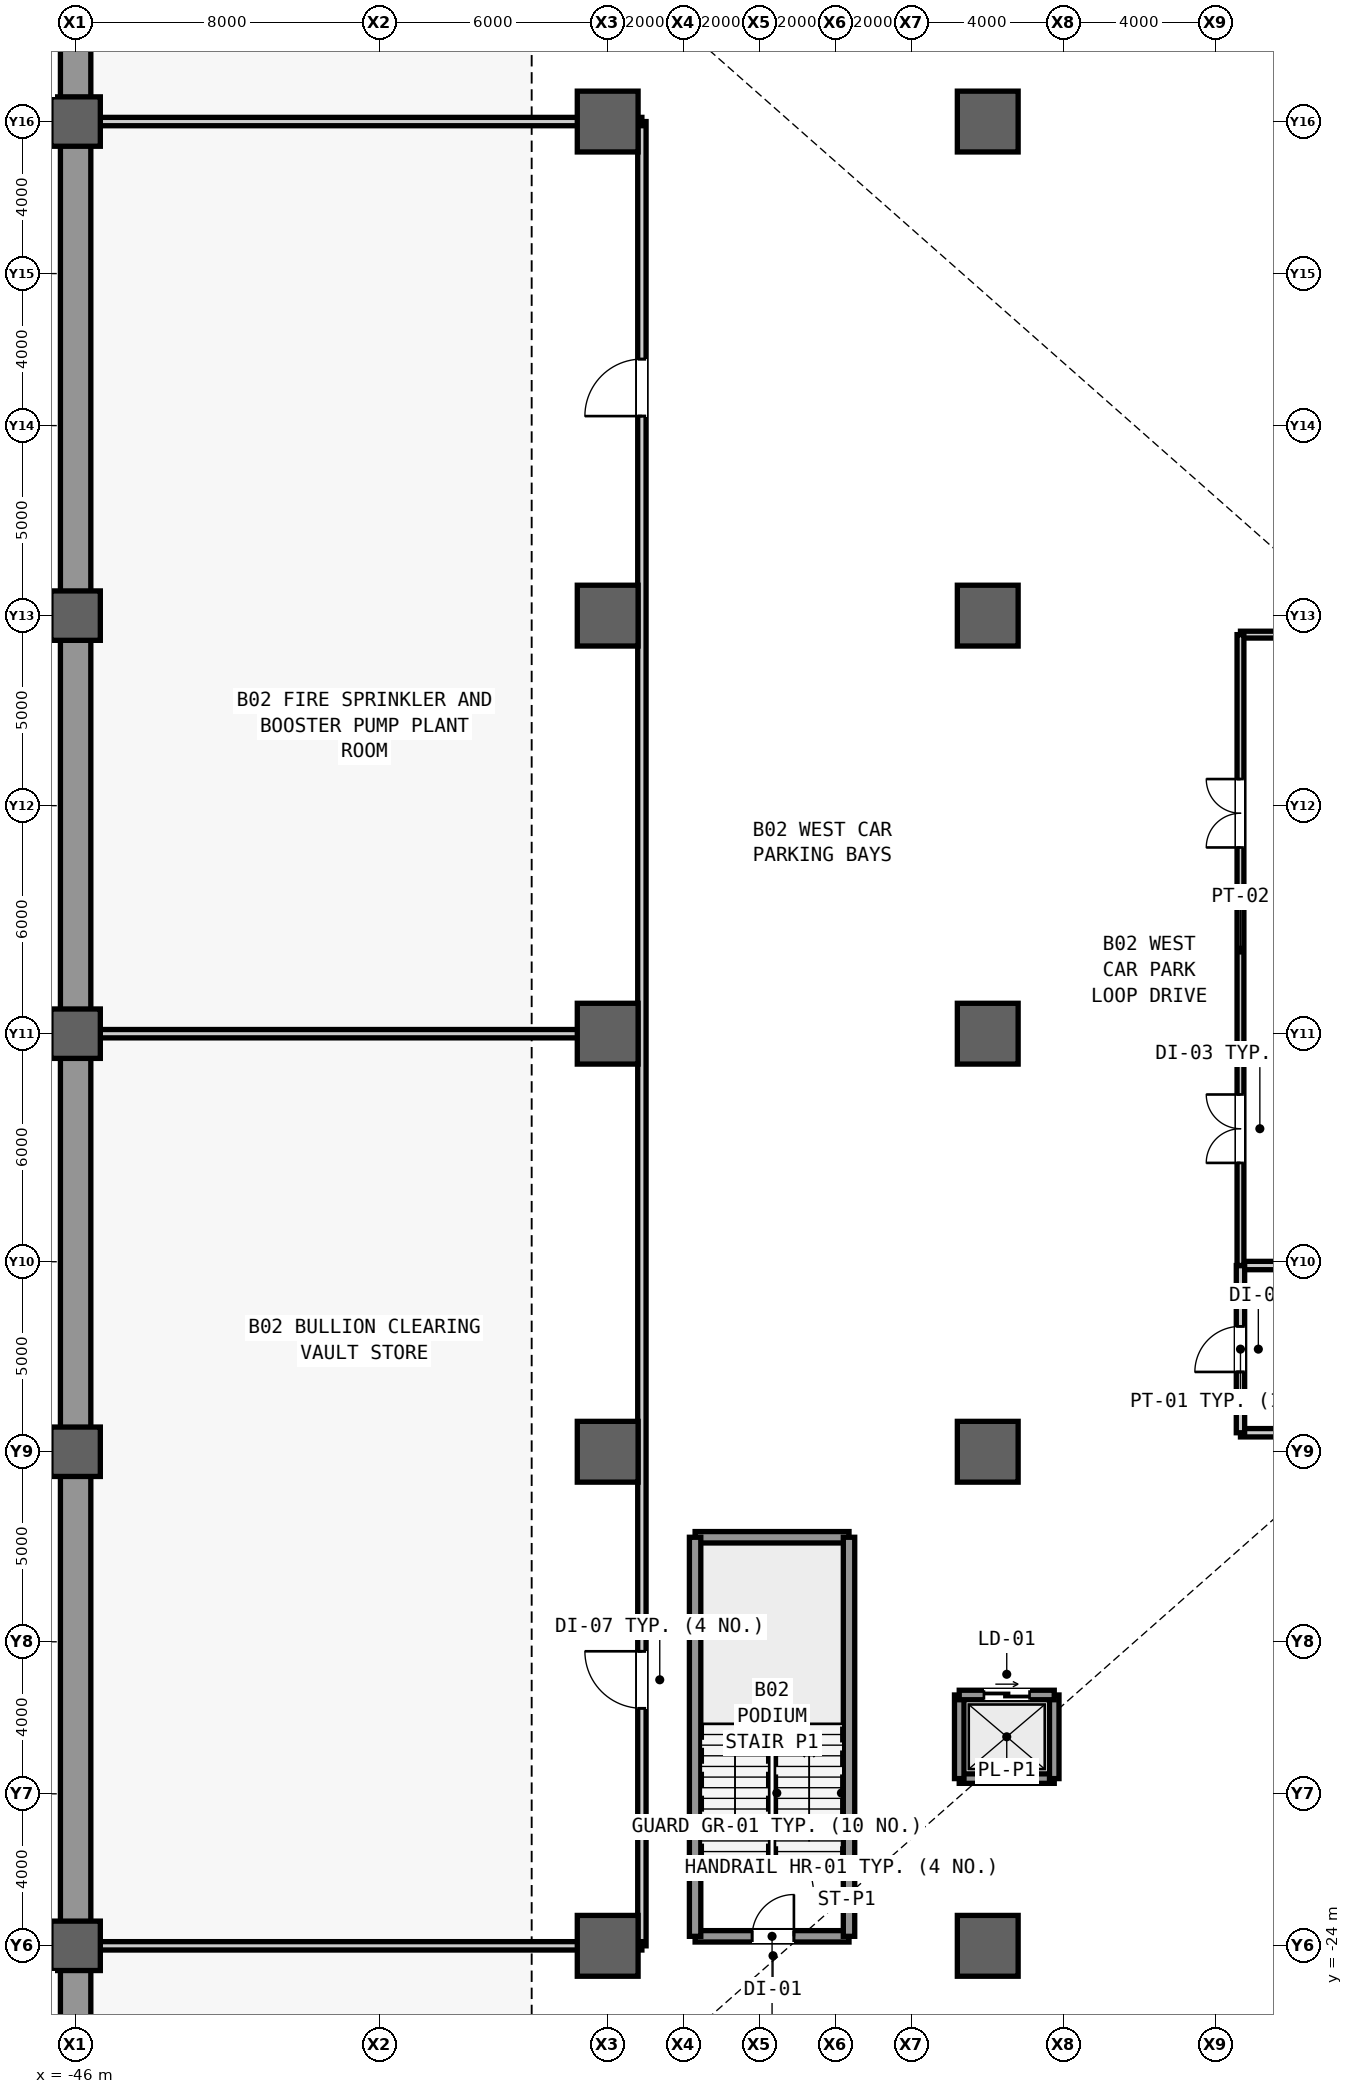
"""IFC4 building model, lengths in metres.
Left out: names, types, materials, properties, quantities, classifications, styles, units other than length and angle.
Written with IfcOpenShell. Run it as: python <this file> out.ifc"""

import sys

from ifc_helpers import new_model, si_unit, direction, frame, frame_2d, origin, origin_2d, place, context, subcontext, project, spatial, rectangle, extrude, source, transform, mapped, element, fill, save


model = new_model("IFC4")
c1 = context("Model", 3, precision=1e-05, world=origin(), true_north=direction((0.0, 1.0)))
c2 = subcontext(c1, "Body", "Model", "MODEL_VIEW")
j1 = project(units=[si_unit("LENGTHUNIT", "METRE"), si_unit("PLANEANGLEUNIT", "RADIAN")], contexts=[c1])
p1 = place(None, origin())
s1 = spatial("IfcSite", under=j1, at=p1, CompositionType="ELEMENT")
p2 = place(p1, origin())
s2 = spatial("IfcBuilding", under=s1, at=p2, CompositionType="ELEMENT")
p3 = place(p2, frame((0.0, 0.0, -9.6)))
s3 = spatial("IfcBuildingStorey", under=s2, at=p3, CompositionType="ELEMENT", Elevation=-9.6)
m1 = source(origin(), c2, "Body", "SweptSolid", [
    extrude(rectangle(XDim=74.4, YDim=0.8, at=frame_2d((37.2, 0.0))), origin(), (0.0, 0.0, 1.0), 4.48),
])
p4 = place(p3, frame((-46.0, -37.2, 0.0), z_axis=(0.0, 0.0, 1.0), x_axis=(0.0, 1.0, 0.0)))
e1 = element("IfcWall", 1, at=p4, inside=s3, PredefinedType="USERDEFINED", context=c2, shape_type="MappedRepresentation", body=[
    mapped(m1, transform((0.0, 0.0, 0.0), scale=1.0)),
])
m2 = source(origin(), c2, "Body", "SweptSolid", [
    extrude(rectangle(XDim=1.3, YDim=1.3, at=origin_2d()), origin(), (0.0, 0.0, 1.0), 4.8),
])
for number, where, z_axis, x_axis in (
    (2, (-46.0, -24.0, 0.0), (0.0, 0.0, 1.0), (1.0, 0.0, 0.0)),
    (3, (-46.0, -11.0, 0.0), (0.0, 0.0, 1.0), (1.0, 0.0, 0.0)),
    (4, (-46.0, 0.0, 0.0), (0.0, 0.0, 1.0), (1.0, 0.0, 0.0)),
    (5, (-46.0, 11.0, 0.0), (0.0, 0.0, 1.0), (1.0, 0.0, 0.0)),
    (6, (-46.0, 24.0, 0.0), (0.0, 0.0, 1.0), (1.0, 0.0, 0.0)),
):
    element("IfcColumn", number, at=place(p3, frame(where, z_axis=z_axis, x_axis=x_axis)), inside=s3, PredefinedType="COLUMN", context=c2, shape_type="MappedRepresentation", body=[
        mapped(m2, transform((0.0, 0.0, 0.0), scale=1.0)),
    ])
m3 = source(origin(), c2, "Body", "SweptSolid", [
    extrude(rectangle(XDim=1.6, YDim=1.6, at=origin_2d()), origin(), (0.0, 0.0, 1.0), 4.8),
])
for number, where, z_axis, x_axis in (
    (7, (-32.0, -24.0, 0.0), (0.0, 0.0, 1.0), (1.0, 0.0, 0.0)),
    (8, (-32.0, -11.0, 0.0), (0.0, 0.0, 1.0), (1.0, 0.0, 0.0)),
    (9, (-32.0, 0.0, 0.0), (0.0, 0.0, 1.0), (1.0, 0.0, 0.0)),
    (10, (-32.0, 11.0, 0.0), (0.0, 0.0, 1.0), (1.0, 0.0, 0.0)),
    (11, (-32.0, 24.0, 0.0), (0.0, 0.0, 1.0), (1.0, 0.0, 0.0)),
    (12, (-22.0, -24.0, 0.0), (0.0, 0.0, 1.0), (1.0, 0.0, 0.0)),
    (13, (-22.0, -11.0, 0.0), (0.0, 0.0, 1.0), (1.0, 0.0, 0.0)),
    (14, (-22.0, 0.0, 0.0), (0.0, 0.0, 1.0), (1.0, 0.0, 0.0)),
    (15, (-22.0, 11.0, 0.0), (0.0, 0.0, 1.0), (1.0, 0.0, 0.0)),
    (16, (-22.0, 24.0, 0.0), (0.0, 0.0, 1.0), (1.0, 0.0, 0.0)),
):
    element("IfcColumn", number, at=place(p3, frame(where, z_axis=z_axis, x_axis=x_axis)), inside=s3, PredefinedType="COLUMN", context=c2, shape_type="MappedRepresentation", body=[
        mapped(m3, transform((0.0, 0.0, 0.0), scale=1.0)),
    ])
m4 = source(origin(), c2, "Body", "SweptSolid", [
    extrude(rectangle(XDim=4.05, YDim=0.22, at=frame_2d((2.025, 0.0))), origin(), (0.0, 0.0, 1.0), 4.48),
])
for number, where, z_axis, x_axis in (
    (17, (-15.35, -10.5, 0.0), (0.0, 0.0, 1.0), (1.0, 0.0, 0.0)),
    (18, (-15.35, -6.1, 0.0), (0.0, 0.0, 1.0), (1.0, 0.0, 0.0)),
):
    element("IfcWall", number, at=place(p3, frame(where, z_axis=z_axis, x_axis=x_axis)), inside=s3, PredefinedType="PARTITIONING", context=c2, shape_type="MappedRepresentation", body=[
        mapped(m4, transform((0.0, 0.0, 0.0), scale=1.0)),
    ])
m5 = source(origin(), c2, "Body", "SweptSolid", [
    extrude(rectangle(XDim=4.4, YDim=0.22, at=frame_2d((2.2, 0.0))), origin(), (0.0, 0.0, 1.0), 4.48),
])
p5 = place(p3, frame((-15.35, -10.5, 0.0), z_axis=(0.0, 0.0, 1.0), x_axis=(0.0, 1.0, 0.0)))
e19 = element("IfcWall", 19, at=p5, inside=s3, PredefinedType="PARTITIONING", context=c2, shape_type="MappedRepresentation", body=[
    mapped(m5, transform((0.0, 0.0, 0.0), scale=1.0)),
])
m6 = source(origin(), c2, "Body", "SweptSolid", [
    extrude(rectangle(XDim=1.2, YDim=2.2, at=frame_2d((0.6, 1.1))), frame((0.0, 0.12, 0.0), z_axis=(0.0, -1.0, 0.0), x_axis=(1.0, 0.0, 0.0)), (0.0, 0.0, 1.0), 0.24),
])
p6 = place(p5, frame((1.6, 0.0, 0.0)))
e20 = element("IfcOpeningElement", 20, at=p6, cuts=e19, PredefinedType="OPENING", context=c2, shape_type="MappedRepresentation", body=[
    mapped(m6, transform((0.0, 0.0, 0.0), scale=1.0)),
])
m7 = source(origin(), c2, "Body", "SweptSolid", [
    extrude(rectangle(XDim=4.05, YDim=0.18, at=frame_2d((2.025, 0.0))), origin(), (0.0, 0.0, 1.0), 4.48),
])
p7 = place(p3, frame((-15.35, 10.5, 0.0), z_axis=(0.0, 0.0, 1.0), x_axis=(1.0, 0.0, 0.0)))
e21 = element("IfcWall", 21, at=p7, inside=s3, PredefinedType="PARTITIONING", context=c2, shape_type="MappedRepresentation", body=[
    mapped(m7, transform((0.0, 0.0, 0.0), scale=1.0)),
])
m8 = source(origin(), c2, "Body", "SweptSolid", [
    extrude(rectangle(XDim=16.6, YDim=0.18, at=frame_2d((8.3, 0.0))), origin(), (0.0, 0.0, 1.0), 4.48),
])
p8 = place(p3, frame((-15.35, -6.1, 0.0), z_axis=(0.0, 0.0, 1.0), x_axis=(0.0, 1.0, 0.0)))
e22 = element("IfcWall", 22, at=p8, inside=s3, PredefinedType="PARTITIONING", context=c2, shape_type="MappedRepresentation", body=[
    mapped(m8, transform((0.0, 0.0, 0.0), scale=1.0)),
])
m9 = source(origin(), c2, "Body", "SweptSolid", [
    extrude(rectangle(XDim=1.8, YDim=2.25, at=frame_2d((0.9, 1.125))), frame((0.0, 0.1, 0.0), z_axis=(0.0, -1.0, 0.0), x_axis=(1.0, 0.0, 0.0)), (0.0, 0.0, 1.0), 0.2),
])
p9 = place(p8, frame((2.7, 0.0, 0.0)))
e23 = element("IfcOpeningElement", 23, at=p9, cuts=e22, PredefinedType="OPENING", context=c2, shape_type="MappedRepresentation", body=[
    mapped(m9, transform((0.0, 0.0, 0.0), scale=1.0)),
])
p10 = place(p8, frame((11.0, 0.0, 0.0)))
e24 = element("IfcOpeningElement", 24, at=p10, cuts=e22, PredefinedType="OPENING", context=c2, shape_type="MappedRepresentation", body=[
    mapped(m9, transform((0.0, 0.0, 0.0), scale=1.0)),
])
m10 = source(origin(), c2, "Body", "SweptSolid", [
    extrude(rectangle(XDim=4.05, YDim=0.3, at=frame_2d((2.025, 0.0))), origin(), (0.0, 0.0, 1.0), 4.48),
])
p11 = place(p3, frame((-29.7, -23.75, 0.0), z_axis=(0.0, 0.0, 1.0), x_axis=(1.0, 0.0, 0.0)))
e25 = element("IfcWall", 25, at=p11, inside=s3, PredefinedType="SHEAR", context=c2, shape_type="MappedRepresentation", body=[
    mapped(m10, transform((0.0, 0.0, 0.0), scale=1.0)),
])
m11 = source(origin(), c2, "Body", "SweptSolid", [
    extrude(rectangle(XDim=1.1, YDim=2.2, at=frame_2d((0.55, 1.1))), frame((0.0, 0.16, 0.0), z_axis=(0.0, -1.0, 0.0), x_axis=(1.0, 0.0, 0.0)), (0.0, 0.0, 1.0), 0.32),
])
p12 = place(p11, frame((1.5, 0.0, 0.0)))
e26 = element("IfcOpeningElement", 26, at=p12, cuts=e25, PredefinedType="OPENING", context=c2, shape_type="MappedRepresentation", body=[
    mapped(m11, transform((0.0, 0.0, 0.0), scale=1.0)),
])
p13 = place(p3, frame((-29.7, -13.25, 0.0), z_axis=(0.0, 0.0, 1.0), x_axis=(1.0, 0.0, 0.0)))
e27 = element("IfcWall", 27, at=p13, inside=s3, PredefinedType="SHEAR", context=c2, shape_type="MappedRepresentation", body=[
    mapped(m10, transform((0.0, 0.0, 0.0), scale=1.0)),
])
m12 = source(origin(), c2, "Body", "SweptSolid", [
    extrude(rectangle(XDim=10.5, YDim=0.3, at=frame_2d((5.25, 0.0))), origin(), (0.0, 0.0, 1.0), 4.48),
])
for number, where, z_axis, x_axis in (
    (28, (-29.7, -23.75, 0.0), (0.0, 0.0, 1.0), (0.0, 1.0, 0.0)),
    (29, (-25.65, -23.75, 0.0), (0.0, 0.0, 1.0), (0.0, 1.0, 0.0)),
):
    element("IfcWall", number, at=place(p3, frame(where, z_axis=z_axis, x_axis=x_axis)), inside=s3, PredefinedType="SHEAR", context=c2, shape_type="MappedRepresentation", body=[
        mapped(m12, transform((0.0, 0.0, 0.0), scale=1.0)),
    ])
m13 = source(origin(), c2, "Body", "SweptSolid", [
    extrude(rectangle(XDim=2.5, YDim=0.25, at=frame_2d((1.25, 0.0))), origin(), (0.0, 0.0, 1.0), 4.48),
])
p14 = place(p3, frame((-22.75, -19.6, 0.0), z_axis=(0.0, 0.0, 1.0), x_axis=(1.0, 0.0, 0.0)))
e30 = element("IfcWall", 30, at=p14, inside=s3, PredefinedType="SHEAR", context=c2, shape_type="MappedRepresentation", body=[
    mapped(m13, transform((0.0, 0.0, 0.0), scale=1.0)),
])
m14 = source(origin(), c2, "Body", "SweptSolid", [
    extrude(rectangle(XDim=2.2, YDim=0.25, at=frame_2d((1.1, 0.0))), origin(), (0.0, 0.0, 1.0), 4.48),
])
for number, where, z_axis, x_axis in (
    (31, (-22.75, -19.6, 0.0), (0.0, 0.0, 1.0), (0.0, 1.0, 0.0)),
    (32, (-20.25, -19.6, 0.0), (0.0, 0.0, 1.0), (0.0, 1.0, 0.0)),
):
    element("IfcWall", number, at=place(p3, frame(where, z_axis=z_axis, x_axis=x_axis)), inside=s3, PredefinedType="SHEAR", context=c2, shape_type="MappedRepresentation", body=[
        mapped(m14, transform((0.0, 0.0, 0.0), scale=1.0)),
    ])
p15 = place(p3, frame((-22.75, -17.4, 0.0), z_axis=(0.0, 0.0, 1.0), x_axis=(1.0, 0.0, 0.0)))
e33 = element("IfcWall", 33, at=p15, inside=s3, PredefinedType="SHEAR", context=c2, shape_type="MappedRepresentation", body=[
    mapped(m13, transform((0.0, 0.0, 0.0), scale=1.0)),
])
m15 = source(origin(), c2, "Body", "SweptSolid", [
    extrude(rectangle(XDim=1.2, YDim=2.3, at=frame_2d((0.6, 1.15))), frame((0.0, 0.135, 0.0), z_axis=(0.0, -1.0, 0.0), x_axis=(1.0, 0.0, 0.0)), (0.0, 0.0, 1.0), 0.27),
])
p16 = place(p15, frame((0.65, 0.0, 0.0)))
e34 = element("IfcOpeningElement", 34, at=p16, cuts=e33, PredefinedType="OPENING", context=c2, shape_type="MappedRepresentation", body=[
    mapped(m15, transform((0.0, 0.0, 0.0), scale=1.0)),
])
m16 = source(origin(), c2, "Body", "SweptSolid", [
    extrude(rectangle(XDim=14.7, YDim=0.22, at=frame_2d((7.35, 0.0))), origin(), (0.0, 0.0, 1.0), 2.68),
])
p17 = place(p3, frame((-45.8, 0.0, 0.0), z_axis=(0.0, 0.0, 1.0), x_axis=(1.0, 0.0, 0.0)))
e35 = element("IfcWall", 35, at=p17, inside=s3, PredefinedType="PARTITIONING", context=c2, shape_type="MappedRepresentation", body=[
    mapped(m16, transform((0.0, 0.0, 0.0), scale=1.0)),
])
m17 = source(origin(), c2, "Body", "SweptSolid", [
    extrude(rectangle(XDim=48.0, YDim=0.22, at=frame_2d((24.0, 0.0))), origin(), (0.0, 0.0, 1.0), 4.48),
])
p18 = place(p3, frame((-31.1, -24.0, 0.0), z_axis=(0.0, 0.0, 1.0), x_axis=(0.0, 1.0, 0.0)))
e36 = element("IfcWall", 36, at=p18, inside=s3, PredefinedType="PARTITIONING", context=c2, shape_type="MappedRepresentation", body=[
    mapped(m17, transform((0.0, 0.0, 0.0), scale=1.0)),
])
m18 = source(origin(), c2, "Body", "SweptSolid", [
    extrude(rectangle(XDim=1.5, YDim=2.3, at=frame_2d((0.75, 1.15))), frame((0.0, 0.12, 0.0), z_axis=(0.0, -1.0, 0.0), x_axis=(1.0, 0.0, 0.0)), (0.0, 0.0, 1.0), 0.24),
])
p19 = place(p18, frame((6.25, 0.0, 0.0)))
e37 = element("IfcOpeningElement", 37, at=p19, cuts=e36, PredefinedType="OPENING", context=c2, shape_type="MappedRepresentation", body=[
    mapped(m18, transform((0.0, 0.0, 0.0), scale=1.0)),
])
p20 = place(p18, frame((40.25, 0.0, 0.0)))
e38 = element("IfcOpeningElement", 38, at=p20, cuts=e36, PredefinedType="OPENING", context=c2, shape_type="MappedRepresentation", body=[
    mapped(m18, transform((0.0, 0.0, 0.0), scale=1.0)),
])
m19 = source(origin(), c2, "Body", "SweptSolid", [
    extrude(rectangle(XDim=14.7, YDim=0.22, at=frame_2d((7.35, 0.0))), origin(), (0.0, 0.0, 1.0), 3.444),
])
for number, where, z_axis, x_axis in (
    (39, (-45.8, -24.0, 0.0), (0.0, 0.0, 1.0), (1.0, 0.0, 0.0)),
    (40, (-45.8, 24.0, 0.0), (0.0, 0.0, 1.0), (1.0, 0.0, 0.0)),
):
    element("IfcWall", number, at=place(p3, frame(where, z_axis=z_axis, x_axis=x_axis)), inside=s3, PredefinedType="PARTITIONING", context=c2, shape_type="MappedRepresentation", body=[
        mapped(m19, transform((0.0, 0.0, 0.0), scale=1.0)),
    ])
m20 = source(origin(), c2, "Body", "SweptSolid", [
    extrude(rectangle(XDim=1.2, YDim=2.2, at=frame_2d((0.6, 1.1))), frame((0.0, 0.025, 0.0), z_axis=(0.0, -1.0, 0.0), x_axis=(1.0, 0.0, 0.0)), (0.0, 0.0, 1.0), 0.05),
])
p21 = place(p6, origin())
e41 = element("IfcDoor", 41, at=p21, inside=s3, OperationType="SINGLE_SWING_LEFT", PredefinedType="DOOR", context=c2, shape_type="MappedRepresentation", body=[
    mapped(m20, transform((0.0, 0.0, 0.0), scale=1.0)),
])
fill(e20, e41)
m21 = source(origin(), c2, "Body", "SweptSolid", [
    extrude(rectangle(XDim=1.8, YDim=2.25, at=frame_2d((0.9, 1.125))), frame((0.0, 0.025, 0.0), z_axis=(0.0, -1.0, 0.0), x_axis=(1.0, 0.0, 0.0)), (0.0, 0.0, 1.0), 0.05),
])
p22 = place(p9, origin())
e42 = element("IfcDoor", 42, at=p22, inside=s3, OperationType="SINGLE_SWING_LEFT", PredefinedType="DOOR", context=c2, shape_type="MappedRepresentation", body=[
    mapped(m21, transform((0.0, 0.0, 0.0), scale=1.0)),
])
fill(e23, e42)
p23 = place(p10, origin())
e43 = element("IfcDoor", 43, at=p23, inside=s3, OperationType="SINGLE_SWING_RIGHT", PredefinedType="DOOR", context=c2, shape_type="MappedRepresentation", body=[
    mapped(m21, transform((0.0, 0.0, 0.0), scale=1.0)),
])
fill(e24, e43)
m22 = source(origin(), c2, "Body", "SweptSolid", [
    extrude(rectangle(XDim=1.1, YDim=2.2, at=frame_2d((0.55, 1.1))), frame((0.0, 0.025, 0.0), z_axis=(0.0, -1.0, 0.0), x_axis=(1.0, 0.0, 0.0)), (0.0, 0.0, 1.0), 0.05),
])
p24 = place(p12, origin())
e44 = element("IfcDoor", 44, at=p24, inside=s3, OperationType="SINGLE_SWING_RIGHT", PredefinedType="DOOR", context=c2, shape_type="MappedRepresentation", body=[
    mapped(m22, transform((0.0, 0.0, 0.0), scale=1.0)),
])
fill(e26, e44)
m23 = source(origin(), c2, "Body", "SweptSolid", [
    extrude(rectangle(XDim=1.5, YDim=2.3, at=frame_2d((0.75, 1.15))), frame((0.0, 0.025, 0.0), z_axis=(0.0, -1.0, 0.0), x_axis=(1.0, 0.0, 0.0)), (0.0, 0.0, 1.0), 0.05),
])
p25 = place(p19, origin())
e45 = element("IfcDoor", 45, at=p25, inside=s3, OperationType="SINGLE_SWING_RIGHT", PredefinedType="DOOR", context=c2, shape_type="MappedRepresentation", body=[
    mapped(m23, transform((0.0, 0.0, 0.0), scale=1.0)),
])
fill(e37, e45)
p26 = place(p20, origin())
e46 = element("IfcDoor", 46, at=p26, inside=s3, OperationType="SINGLE_SWING_LEFT", PredefinedType="DOOR", context=c2, shape_type="MappedRepresentation", body=[
    mapped(m23, transform((0.0, 0.0, 0.0), scale=1.0)),
])
fill(e38, e46)
m24 = source(origin(), c2, "Body", "SweptSolid", [
    extrude(rectangle(XDim=1.2, YDim=2.3, at=frame_2d((0.6, 1.15))), frame((0.0, 0.025, 0.0), z_axis=(0.0, -1.0, 0.0), x_axis=(1.0, 0.0, 0.0)), (0.0, 0.0, 1.0), 0.05),
])
p27 = place(p16, origin())
e47 = element("IfcDoor", 47, at=p27, inside=s3, OperationType="SLIDING_TO_LEFT", PredefinedType="DOOR", context=c2, shape_type="MappedRepresentation", body=[
    mapped(m24, transform((0.0, 0.0, 0.0), scale=1.0)),
])
fill(e34, e47)
save(model, sys.argv[1])
